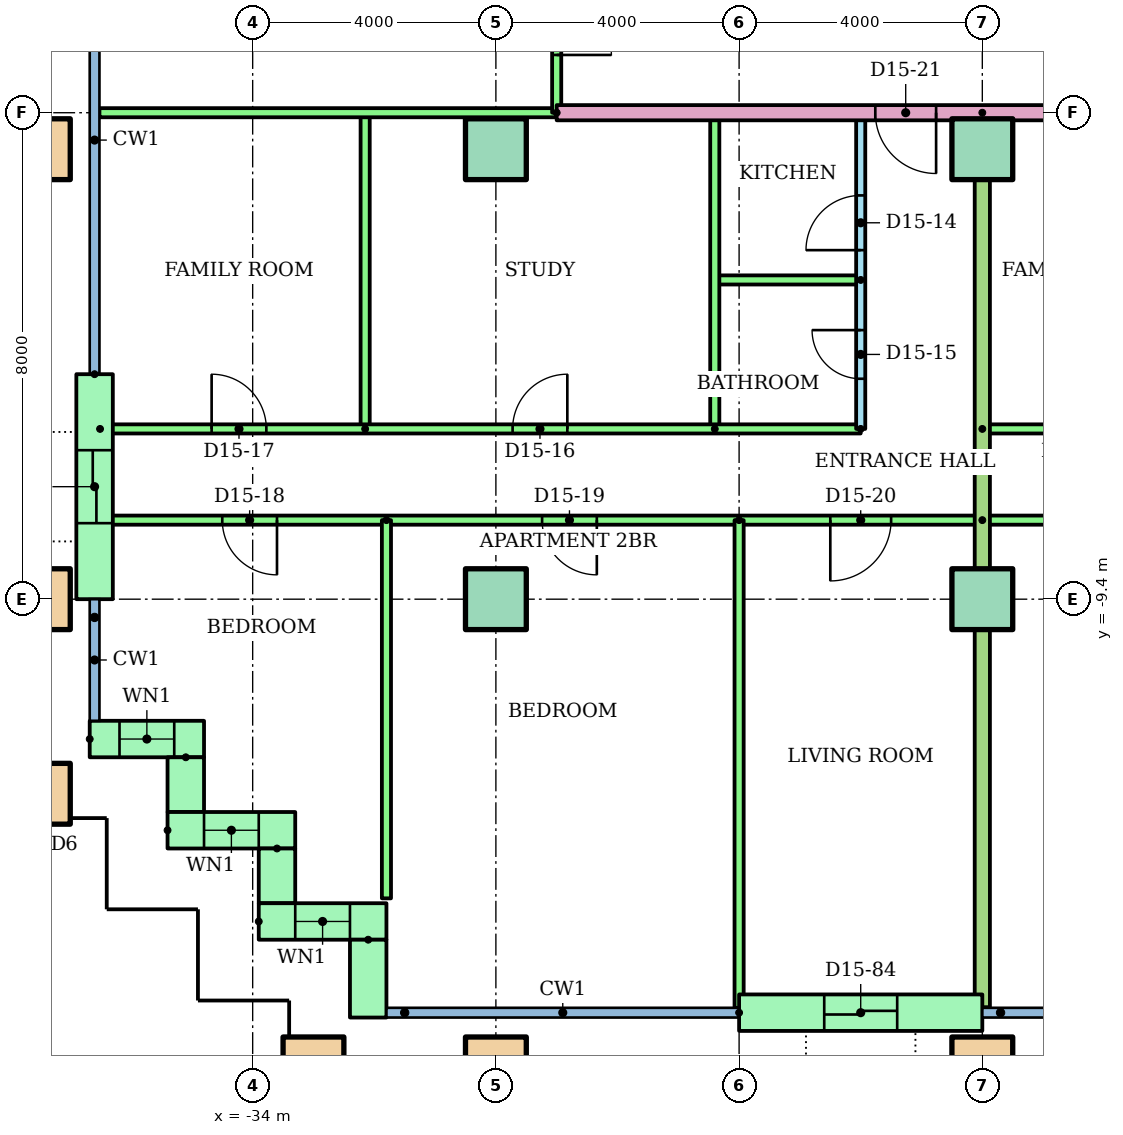
"""IFC4 building model, lengths in metres.
Left out: names, types, materials, properties, quantities, classifications, styles, units other than length and angle.
Written with IfcOpenShell. Run it as: python <this file> out.ifc"""

import sys

from ifc_helpers import new_model, si_unit, direction, frame, frame_2d, origin, origin_2d, place, context, subcontext, project, spatial, rectangle, hollow_rectangle, extrude, element, fill, save


model = new_model("IFC4")
c1 = context("Model", 3, precision=1e-05, world=origin(), true_north=direction((0.0, 1.0)))
c2 = subcontext(c1, "Body", "Model", "MODEL_VIEW")
j1 = project(units=[si_unit("LENGTHUNIT", "METRE"), si_unit("PLANEANGLEUNIT", "RADIAN")], contexts=[c1])
p1 = place(None, origin())
s1 = spatial("IfcSite", under=j1, at=p1, CompositionType="ELEMENT")
p2 = place(p1, origin())
s2 = spatial("IfcBuilding", under=s1, at=p2, CompositionType="ELEMENT")
p3 = place(p2, frame((0.0, 0.0, 57.6)))
s3 = spatial("IfcBuildingStorey", under=s2, at=p3, CompositionType="ELEMENT", Elevation=57.6)
for number, where in (
    (1, (-33.0, -17.1, 0.0)),
    (2, (-30.0, -17.1, 0.0)),
    (3, (-22.0, -17.1, 0.0)),
    (4, (-37.5, -12.6, 0.0)),
    (5, (-37.5, -9.4, 0.0)),
):
    element("IfcColumn", number, at=place(p3, frame(where)), inside=s3, PredefinedType="COLUMN", context=c2, shape_type="SweptSolid", body=[
        extrude(hollow_rectangle(XDim=1.0, YDim=1.0, WallThickness=0.05, at=origin_2d()), origin(), (0.0, 0.0, 1.0), 3.2),
    ])
for number, where in (
    (6, (-30.0, -9.4, 0.0)),
    (7, (-22.0, -9.4, 0.0)),
):
    element("IfcColumn", number, at=place(p3, frame(where)), inside=s3, PredefinedType="COLUMN", context=c2, shape_type="SweptSolid", body=[
        extrude(rectangle(XDim=1.0, YDim=1.0, at=origin_2d()), origin(), (0.0, 0.0, 1.0), 3.2),
    ])
p4 = place(p3, frame((-37.5, -2.0, 0.0)))
e8 = element("IfcColumn", 8, at=p4, inside=s3, PredefinedType="COLUMN", context=c2, shape_type="SweptSolid", body=[
    extrude(hollow_rectangle(XDim=1.0, YDim=1.0, WallThickness=0.05, at=origin_2d()), origin(), (0.0, 0.0, 1.0), 3.2),
])
for number, where in (
    (9, (-30.0, -2.0, 0.0)),
    (10, (-22.0, -2.0, 0.0)),
):
    element("IfcColumn", number, at=place(p3, frame(where)), inside=s3, PredefinedType="COLUMN", context=c2, shape_type="SweptSolid", body=[
        extrude(rectangle(XDim=1.0, YDim=1.0, at=origin_2d()), origin(), (0.0, 0.0, 1.0), 3.2),
    ])
p5 = place(p3, frame((-36.6, -5.7, 0.0), z_axis=(0.0, 0.0, 1.0), x_axis=(0.0, -1.0, 0.0)))
e11 = element("IfcWall", 11, at=p5, inside=s3, PredefinedType="STANDARD", context=c2, shape_type="SweptSolid", body=[
    extrude(rectangle(XDim=3.7, YDim=0.6, at=frame_2d((1.85, 0.0))), origin(), (0.0, 0.0, 1.0), 2.92),
])
p6 = place(p5, frame((1.25, 0.0, 0.0)))
e12 = element("IfcOpeningElement", 12, at=p6, cuts=e11, PredefinedType="OPENING", context=c2, shape_type="SweptSolid", body=[
    extrude(rectangle(XDim=1.2, YDim=2.1, at=frame_2d((0.6, 1.05))), frame((0.0, 0.31, 0.0), z_axis=(0.0, -1.0, 0.0), x_axis=(1.0, 0.0, 0.0)), (0.0, 0.0, 1.0), 0.62),
])
p7 = place(p3, frame((-36.68, -11.7, 0.0)))
e13 = element("IfcWall", 13, at=p7, inside=s3, PredefinedType="STANDARD", context=c2, shape_type="SweptSolid", body=[
    extrude(rectangle(XDim=1.88, YDim=0.6, at=frame_2d((0.94, 0.0))), origin(), (0.0, 0.0, 1.0), 2.92),
])
p8 = place(p7, frame((0.49, 0.0, 0.9)))
e14 = element("IfcOpeningElement", 14, at=p8, cuts=e13, PredefinedType="OPENING", context=c2, shape_type="SweptSolid", body=[
    extrude(rectangle(XDim=0.9, YDim=1.5, at=frame_2d((0.45, 0.75))), frame((0.0, 0.31, 0.0), z_axis=(0.0, -1.0, 0.0), x_axis=(1.0, 0.0, 0.0)), (0.0, 0.0, 1.0), 0.62),
])
p9 = place(p3, frame((-35.1, -12.0, 0.0), z_axis=(0.0, 0.0, 1.0), x_axis=(0.0, -1.0, 0.0)))
e15 = element("IfcWall", 15, at=p9, inside=s3, PredefinedType="STANDARD", context=c2, shape_type="SweptSolid", body=[
    extrude(rectangle(XDim=0.9, YDim=0.6, at=frame_2d((0.45, 0.0))), origin(), (0.0, 0.0, 1.0), 2.92),
])
p10 = place(p3, frame((-35.4, -13.2, 0.0)))
e16 = element("IfcWall", 16, at=p10, inside=s3, PredefinedType="STANDARD", context=c2, shape_type="SweptSolid", body=[
    extrude(rectangle(XDim=2.1, YDim=0.6, at=frame_2d((1.05, 0.0))), origin(), (0.0, 0.0, 1.0), 2.92),
])
p11 = place(p10, frame((0.6, 0.0, 0.9)))
e17 = element("IfcOpeningElement", 17, at=p11, cuts=e16, PredefinedType="OPENING", context=c2, shape_type="SweptSolid", body=[
    extrude(rectangle(XDim=0.9, YDim=1.5, at=frame_2d((0.45, 0.75))), frame((0.0, 0.31, 0.0), z_axis=(0.0, -1.0, 0.0), x_axis=(1.0, 0.0, 0.0)), (0.0, 0.0, 1.0), 0.62),
])
p12 = place(p3, frame((-33.6, -13.5, 0.0), z_axis=(0.0, 0.0, 1.0), x_axis=(0.0, -1.0, 0.0)))
e18 = element("IfcWall", 18, at=p12, inside=s3, PredefinedType="STANDARD", context=c2, shape_type="SweptSolid", body=[
    extrude(rectangle(XDim=0.9, YDim=0.6, at=frame_2d((0.45, 0.0))), origin(), (0.0, 0.0, 1.0), 2.92),
])
p13 = place(p3, frame((-33.9, -14.7, 0.0)))
e19 = element("IfcWall", 19, at=p13, inside=s3, PredefinedType="STANDARD", context=c2, shape_type="SweptSolid", body=[
    extrude(rectangle(XDim=2.1, YDim=0.6, at=frame_2d((1.05, 0.0))), origin(), (0.0, 0.0, 1.0), 2.92),
])
p14 = place(p13, frame((0.6, 0.0, 0.9)))
e20 = element("IfcOpeningElement", 20, at=p14, cuts=e19, PredefinedType="OPENING", context=c2, shape_type="SweptSolid", body=[
    extrude(rectangle(XDim=0.9, YDim=1.5, at=frame_2d((0.45, 0.75))), frame((0.0, 0.31, 0.0), z_axis=(0.0, -1.0, 0.0), x_axis=(1.0, 0.0, 0.0)), (0.0, 0.0, 1.0), 0.62),
])
p15 = place(p3, frame((-32.1, -15.0, 0.0), z_axis=(0.0, 0.0, 1.0), x_axis=(0.0, -1.0, 0.0)))
e21 = element("IfcWall", 21, at=p15, inside=s3, PredefinedType="STANDARD", context=c2, shape_type="SweptSolid", body=[
    extrude(rectangle(XDim=1.28, YDim=0.6, at=frame_2d((0.64, 0.0))), origin(), (0.0, 0.0, 1.0), 2.92),
])
p16 = place(p3, frame((-26.0, -16.2, 0.0)))
e22 = element("IfcWall", 22, at=p16, inside=s3, PredefinedType="STANDARD", context=c2, shape_type="SweptSolid", body=[
    extrude(rectangle(XDim=4.0, YDim=0.6, at=frame_2d((2.0, 0.0))), origin(), (0.0, 0.0, 1.0), 2.92),
])
p17 = place(p16, frame((1.4, 0.0, 0.0)))
e23 = element("IfcOpeningElement", 23, at=p17, cuts=e22, PredefinedType="OPENING", context=c2, shape_type="SweptSolid", body=[
    extrude(rectangle(XDim=1.2, YDim=2.1, at=frame_2d((0.6, 1.05))), frame((0.0, 0.31, 0.0), z_axis=(0.0, -1.0, 0.0), x_axis=(1.0, 0.0, 0.0)), (0.0, 0.0, 1.0), 0.62),
])
p18 = place(p3, frame((-24.0, -6.6, 0.0), z_axis=(0.0, 0.0, 1.0), x_axis=(0.0, 1.0, 0.0)))
e24 = element("IfcWall", 24, at=p18, inside=s3, PredefinedType="PARTITIONING", context=c2, shape_type="SweptSolid", body=[
    extrude(rectangle(XDim=5.2, YDim=0.15, at=frame_2d((2.6, 0.0))), origin(), (0.0, 0.0, 1.0), 2.4),
])
p19 = place(p18, frame((2.94, 0.0, 0.0)))
e25 = element("IfcOpeningElement", 25, at=p19, cuts=e24, PredefinedType="OPENING", context=c2, shape_type="SweptSolid", body=[
    extrude(rectangle(XDim=0.9, YDim=2.1, at=frame_2d((0.45, 1.05))), frame((0.0, 0.085, 0.0), z_axis=(0.0, -1.0, 0.0), x_axis=(1.0, 0.0, 0.0)), (0.0, 0.0, 1.0), 0.17),
])
p20 = place(p18, frame((0.825, 0.0, 0.0)))
e26 = element("IfcOpeningElement", 26, at=p20, cuts=e24, PredefinedType="OPENING", context=c2, shape_type="SweptSolid", body=[
    extrude(rectangle(XDim=0.8, YDim=2.1, at=frame_2d((0.4, 1.05))), frame((0.0, 0.085, 0.0), z_axis=(0.0, -1.0, 0.0), x_axis=(1.0, 0.0, 0.0)), (0.0, 0.0, 1.0), 0.17),
])
p21 = place(p3, frame((-24.0, -4.15, 0.0), z_axis=(0.0, 0.0, 1.0), x_axis=(-1.0, 0.0, 0.0)))
e27 = element("IfcWall", 27, at=p21, inside=s3, PredefinedType="PARTITIONING", context=c2, shape_type="SweptSolid", body=[
    extrude(rectangle(XDim=2.4, YDim=0.15, at=frame_2d((1.2, 0.0))), origin(), (0.0, 0.0, 1.0), 2.4),
])
for number, where, z_axis, x_axis in (
    (28, (-26.4, -6.6, 0.0), (0.0, 0.0, 1.0), (0.0, 1.0, 0.0)),
    (29, (-32.15, -6.6, 0.0), (0.0, 0.0, 1.0), (0.0, 1.0, 0.0)),
):
    element("IfcWall", number, at=place(p3, frame(where, z_axis=z_axis, x_axis=x_axis)), inside=s3, PredefinedType="PARTITIONING", context=c2, shape_type="SweptSolid", body=[
        extrude(rectangle(XDim=5.2, YDim=0.15, at=frame_2d((2.6, 0.0))), origin(), (0.0, 0.0, 1.0), 2.4),
    ])
p22 = place(p3, frame((-36.51, -6.6, 0.0)))
e30 = element("IfcWall", 30, at=p22, inside=s3, PredefinedType="PARTITIONING", context=c2, shape_type="SweptSolid", body=[
    extrude(rectangle(XDim=12.51, YDim=0.15, at=frame_2d((6.255, 0.0))), origin(), (0.0, 0.0, 1.0), 2.4),
])
p23 = place(p22, frame((6.785, 0.0, 0.0)))
e31 = element("IfcOpeningElement", 31, at=p23, cuts=e30, PredefinedType="OPENING", context=c2, shape_type="SweptSolid", body=[
    extrude(rectangle(XDim=0.9, YDim=2.1, at=frame_2d((0.45, 1.05))), frame((0.0, 0.085, 0.0), z_axis=(0.0, -1.0, 0.0), x_axis=(1.0, 0.0, 0.0)), (0.0, 0.0, 1.0), 0.17),
])
p24 = place(p22, frame((1.835, 0.0, 0.0)))
e32 = element("IfcOpeningElement", 32, at=p24, cuts=e30, PredefinedType="OPENING", context=c2, shape_type="SweptSolid", body=[
    extrude(rectangle(XDim=0.9, YDim=2.1, at=frame_2d((0.45, 1.05))), frame((0.0, 0.085, 0.0), z_axis=(0.0, -1.0, 0.0), x_axis=(1.0, 0.0, 0.0)), (0.0, 0.0, 1.0), 0.17),
])
p25 = place(p3, frame((-22.0, -8.1, 0.0), z_axis=(0.0, 0.0, 1.0), x_axis=(-1.0, 0.0, 0.0)))
e33 = element("IfcWall", 33, at=p25, inside=s3, PredefinedType="PARTITIONING", context=c2, shape_type="SweptSolid", body=[
    extrude(rectangle(XDim=14.51, YDim=0.15, at=frame_2d((7.255, 0.0))), origin(), (0.0, 0.0, 1.0), 2.4),
])
p26 = place(p25, frame((11.6, 0.0, 0.0)))
e34 = element("IfcOpeningElement", 34, at=p26, cuts=e33, PredefinedType="OPENING", context=c2, shape_type="SweptSolid", body=[
    extrude(rectangle(XDim=0.9, YDim=2.1, at=frame_2d((0.45, 1.05))), frame((0.0, 0.085, 0.0), z_axis=(0.0, -1.0, 0.0), x_axis=(1.0, 0.0, 0.0)), (0.0, 0.0, 1.0), 0.17),
])
p27 = place(p25, frame((6.34, 0.0, 0.0)))
e35 = element("IfcOpeningElement", 35, at=p27, cuts=e33, PredefinedType="OPENING", context=c2, shape_type="SweptSolid", body=[
    extrude(rectangle(XDim=0.9, YDim=2.1, at=frame_2d((0.45, 1.05))), frame((0.0, 0.085, 0.0), z_axis=(0.0, -1.0, 0.0), x_axis=(1.0, 0.0, 0.0)), (0.0, 0.0, 1.0), 0.17),
])
p28 = place(p25, frame((1.5, 0.0, 0.0)))
e36 = element("IfcOpeningElement", 36, at=p28, cuts=e33, PredefinedType="OPENING", context=c2, shape_type="SweptSolid", body=[
    extrude(rectangle(XDim=1.0, YDim=2.1, at=frame_2d((0.5, 1.05))), frame((0.0, 0.085, 0.0), z_axis=(0.0, -1.0, 0.0), x_axis=(1.0, 0.0, 0.0)), (0.0, 0.0, 1.0), 0.17),
])
p29 = place(p3, frame((-31.8, -8.1, 0.0), z_axis=(0.0, 0.0, 1.0), x_axis=(0.0, -1.0, 0.0)))
e37 = element("IfcWall", 37, at=p29, inside=s3, PredefinedType="PARTITIONING", context=c2, shape_type="SweptSolid", body=[
    extrude(rectangle(XDim=6.22, YDim=0.15, at=frame_2d((3.11, 0.0))), origin(), (0.0, 0.0, 1.0), 2.4),
])
p30 = place(p3, frame((-26.0, -8.1, 0.0), z_axis=(0.0, 0.0, 1.0), x_axis=(0.0, -1.0, 0.0)))
e38 = element("IfcWall", 38, at=p30, inside=s3, PredefinedType="PARTITIONING", context=c2, shape_type="SweptSolid", body=[
    extrude(rectangle(XDim=8.021, YDim=0.15, at=frame_2d((4.01, 0.0))), origin(), (0.0, 0.0, 1.0), 2.4),
])
p31 = place(p3, frame((-22.0, -6.6, 0.0)))
e39 = element("IfcWall", 39, at=p31, inside=s3, PredefinedType="PARTITIONING", context=c2, shape_type="SweptSolid", body=[
    extrude(rectangle(XDim=14.0, YDim=0.15, at=frame_2d((7.0, 0.0))), origin(), (0.0, 0.0, 1.0), 2.4),
])
p32 = place(p31, frame((8.775, 0.0, 0.0)))
e40 = element("IfcOpeningElement", 40, at=p32, cuts=e39, PredefinedType="OPENING", context=c2, shape_type="SweptSolid", body=[
    extrude(rectangle(XDim=0.9, YDim=2.1, at=frame_2d((0.45, 1.05))), frame((0.0, 0.085, 0.0), z_axis=(0.0, -1.0, 0.0), x_axis=(1.0, 0.0, 0.0)), (0.0, 0.0, 1.0), 0.17),
])
p33 = place(p31, frame((4.525, 0.0, 0.0)))
e41 = element("IfcOpeningElement", 41, at=p33, cuts=e39, PredefinedType="OPENING", context=c2, shape_type="SweptSolid", body=[
    extrude(rectangle(XDim=0.9, YDim=2.1, at=frame_2d((0.45, 1.05))), frame((0.0, 0.085, 0.0), z_axis=(0.0, -1.0, 0.0), x_axis=(1.0, 0.0, 0.0)), (0.0, 0.0, 1.0), 0.17),
])
p34 = place(p31, frame((1.1, 0.0, 0.0)))
e42 = element("IfcOpeningElement", 42, at=p34, cuts=e39, PredefinedType="OPENING", context=c2, shape_type="SweptSolid", body=[
    extrude(rectangle(XDim=0.9, YDim=2.1, at=frame_2d((0.45, 1.05))), frame((0.0, 0.085, 0.0), z_axis=(0.0, -1.0, 0.0), x_axis=(1.0, 0.0, 0.0)), (0.0, 0.0, 1.0), 0.17),
])
p35 = place(p3, frame((-6.0, -8.1, 0.0), z_axis=(0.0, 0.0, 1.0), x_axis=(-1.0, 0.0, 0.0)))
e43 = element("IfcWall", 43, at=p35, inside=s3, PredefinedType="PARTITIONING", context=c2, shape_type="SweptSolid", body=[
    extrude(rectangle(XDim=16.0, YDim=0.15, at=frame_2d((8.0, 0.0))), origin(), (0.0, 0.0, 1.0), 2.4),
])
p36 = place(p35, frame((13.55, 0.0, 0.0)))
e44 = element("IfcOpeningElement", 44, at=p36, cuts=e43, PredefinedType="OPENING", context=c2, shape_type="SweptSolid", body=[
    extrude(rectangle(XDim=0.9, YDim=2.1, at=frame_2d((0.45, 1.05))), frame((0.0, 0.085, 0.0), z_axis=(0.0, -1.0, 0.0), x_axis=(1.0, 0.0, 0.0)), (0.0, 0.0, 1.0), 0.17),
])
p37 = place(p35, frame((9.5, 0.0, 0.0)))
e45 = element("IfcOpeningElement", 45, at=p37, cuts=e43, PredefinedType="OPENING", context=c2, shape_type="SweptSolid", body=[
    extrude(rectangle(XDim=1.0, YDim=2.1, at=frame_2d((0.5, 1.05))), frame((0.0, 0.085, 0.0), z_axis=(0.0, -1.0, 0.0), x_axis=(1.0, 0.0, 0.0)), (0.0, 0.0, 1.0), 0.17),
])
p38 = place(p35, frame((5.55, 0.0, 0.0)))
e46 = element("IfcOpeningElement", 46, at=p38, cuts=e43, PredefinedType="OPENING", context=c2, shape_type="SweptSolid", body=[
    extrude(rectangle(XDim=0.9, YDim=2.1, at=frame_2d((0.45, 1.05))), frame((0.0, 0.085, 0.0), z_axis=(0.0, -1.0, 0.0), x_axis=(1.0, 0.0, 0.0)), (0.0, 0.0, 1.0), 0.17),
])
p39 = place(p35, frame((1.55, 0.0, 0.0)))
e47 = element("IfcOpeningElement", 47, at=p39, cuts=e43, PredefinedType="OPENING", context=c2, shape_type="SweptSolid", body=[
    extrude(rectangle(XDim=0.9, YDim=2.1, at=frame_2d((0.45, 1.05))), frame((0.0, 0.085, 0.0), z_axis=(0.0, -1.0, 0.0), x_axis=(1.0, 0.0, 0.0)), (0.0, 0.0, 1.0), 0.17),
])
p40 = place(p3, frame((-22.0, -1.4, 0.0), z_axis=(0.0, 0.0, 1.0), x_axis=(0.0, -1.0, 0.0)))
e48 = element("IfcWall", 48, at=p40, inside=s3, PredefinedType="PARTITIONING", context=c2, shape_type="SweptSolid", body=[
    extrude(rectangle(XDim=14.71, YDim=0.25, at=frame_2d((7.355, 0.0))), origin(), (0.0, 0.0, 1.0), 2.4),
])
p41 = place(p3, frame((-14.0, -1.4, 0.0), z_axis=(0.0, 0.0, 1.0), x_axis=(-1.0, 0.0, 0.0)))
e49 = element("IfcWall", 49, at=p41, inside=s3, PredefinedType="PARTITIONING", context=c2, shape_type="SweptSolid", body=[
    extrude(rectangle(XDim=15.0, YDim=0.25, at=frame_2d((7.5, 0.0))), origin(), (0.0, 0.0, 1.0), 2.4),
])
p42 = place(p41, frame((8.76, 0.0, 0.0)))
e50 = element("IfcOpeningElement", 50, at=p42, cuts=e49, PredefinedType="OPENING", context=c2, shape_type="SweptSolid", body=[
    extrude(rectangle(XDim=1.0, YDim=2.1, at=frame_2d((0.5, 1.05))), frame((0.0, 0.135, 0.0), z_axis=(0.0, -1.0, 0.0), x_axis=(1.0, 0.0, 0.0)), (0.0, 0.0, 1.0), 0.27),
])
p43 = place(p3, frame((-29.0, -1.4, 0.0), z_axis=(0.0, 0.0, 1.0), x_axis=(-1.0, 0.0, 0.0)))
e51 = element("IfcWall", 51, at=p43, inside=s3, PredefinedType="PARTITIONING", context=c2, shape_type="SweptSolid", body=[
    extrude(rectangle(XDim=7.52, YDim=0.15, at=frame_2d((3.76, 0.0))), origin(), (0.0, 0.0, 1.0), 2.4),
])
p44 = place(p3, frame((-29.0, 1.4, 0.0), z_axis=(0.0, 0.0, 1.0), x_axis=(0.0, -1.0, 0.0)))
e52 = element("IfcWall", 52, at=p44, inside=s3, PredefinedType="PARTITIONING", context=c2, shape_type="SweptSolid", body=[
    extrude(rectangle(XDim=2.8, YDim=0.15, at=frame_2d((1.4, 0.0))), origin(), (0.0, 0.0, 1.0), 2.4),
])
p45 = place(p44, frame((0.95, 0.0, 0.0)))
e53 = element("IfcOpeningElement", 53, at=p45, cuts=e52, PredefinedType="OPENING", context=c2, shape_type="SweptSolid", body=[
    extrude(rectangle(XDim=0.9, YDim=2.1, at=frame_2d((0.45, 1.05))), frame((0.0, 0.085, 0.0), z_axis=(0.0, -1.0, 0.0), x_axis=(1.0, 0.0, 0.0)), (0.0, 0.0, 1.0), 0.17),
])
p46 = place(p8, origin())
e54 = element("IfcWindow", 54, at=p46, inside=s3, PartitioningType="SINGLE_PANEL", PredefinedType="WINDOW", context=c2, shape_type="SweptSolid", body=[
    extrude(rectangle(XDim=0.9, YDim=1.5, at=frame_2d((0.45, 0.75))), frame((0.0, 0.03, 0.0), z_axis=(0.0, -1.0, 0.0), x_axis=(1.0, 0.0, 0.0)), (0.0, 0.0, 1.0), 0.06),
])
fill(e14, e54)
p47 = place(p11, origin())
e55 = element("IfcWindow", 55, at=p47, inside=s3, PartitioningType="SINGLE_PANEL", PredefinedType="WINDOW", context=c2, shape_type="SweptSolid", body=[
    extrude(rectangle(XDim=0.9, YDim=1.5, at=frame_2d((0.45, 0.75))), frame((0.0, 0.03, 0.0), z_axis=(0.0, -1.0, 0.0), x_axis=(1.0, 0.0, 0.0)), (0.0, 0.0, 1.0), 0.06),
])
fill(e17, e55)
p48 = place(p14, origin())
e56 = element("IfcWindow", 56, at=p48, inside=s3, PartitioningType="SINGLE_PANEL", PredefinedType="WINDOW", context=c2, shape_type="SweptSolid", body=[
    extrude(rectangle(XDim=0.9, YDim=1.5, at=frame_2d((0.45, 0.75))), frame((0.0, 0.03, 0.0), z_axis=(0.0, -1.0, 0.0), x_axis=(1.0, 0.0, 0.0)), (0.0, 0.0, 1.0), 0.06),
])
fill(e20, e56)
p49 = place(p19, origin())
e57 = element("IfcDoor", 57, at=p49, inside=s3, OperationType="SINGLE_SWING_LEFT", PredefinedType="DOOR", context=c2, shape_type="SweptSolid", body=[
    extrude(rectangle(XDim=0.9, YDim=2.1, at=frame_2d((0.45, 1.05))), frame((0.0, 0.025, 0.0), z_axis=(0.0, -1.0, 0.0), x_axis=(1.0, 0.0, 0.0)), (0.0, 0.0, 1.0), 0.05),
])
fill(e25, e57)
p50 = place(p20, origin())
e58 = element("IfcDoor", 58, at=p50, inside=s3, OperationType="SINGLE_SWING_RIGHT", PredefinedType="DOOR", context=c2, shape_type="SweptSolid", body=[
    extrude(rectangle(XDim=0.8, YDim=2.1, at=frame_2d((0.4, 1.05))), frame((0.0, 0.025, 0.0), z_axis=(0.0, -1.0, 0.0), x_axis=(1.0, 0.0, 0.0)), (0.0, 0.0, 1.0), 0.05),
])
fill(e26, e58)
p51 = place(p23, origin())
e59 = element("IfcDoor", 59, at=p51, inside=s3, OperationType="SINGLE_SWING_RIGHT", PredefinedType="DOOR", context=c2, shape_type="SweptSolid", body=[
    extrude(rectangle(XDim=0.9, YDim=2.1, at=frame_2d((0.45, 1.05))), frame((0.0, 0.025, 0.0), z_axis=(0.0, -1.0, 0.0), x_axis=(1.0, 0.0, 0.0)), (0.0, 0.0, 1.0), 0.05),
])
fill(e31, e59)
p52 = place(p24, origin())
e60 = element("IfcDoor", 60, at=p52, inside=s3, OperationType="SINGLE_SWING_LEFT", PredefinedType="DOOR", context=c2, shape_type="SweptSolid", body=[
    extrude(rectangle(XDim=0.9, YDim=2.1, at=frame_2d((0.45, 1.05))), frame((0.0, 0.025, 0.0), z_axis=(0.0, -1.0, 0.0), x_axis=(1.0, 0.0, 0.0)), (0.0, 0.0, 1.0), 0.05),
])
fill(e32, e60)
p53 = place(p26, origin())
e61 = element("IfcDoor", 61, at=p53, inside=s3, OperationType="SINGLE_SWING_LEFT", PredefinedType="DOOR", context=c2, shape_type="SweptSolid", body=[
    extrude(rectangle(XDim=0.9, YDim=2.1, at=frame_2d((0.45, 1.05))), frame((0.0, 0.025, 0.0), z_axis=(0.0, -1.0, 0.0), x_axis=(1.0, 0.0, 0.0)), (0.0, 0.0, 1.0), 0.05),
])
fill(e34, e61)
p54 = place(p27, origin())
e62 = element("IfcDoor", 62, at=p54, inside=s3, OperationType="SINGLE_SWING_LEFT", PredefinedType="DOOR", context=c2, shape_type="SweptSolid", body=[
    extrude(rectangle(XDim=0.9, YDim=2.1, at=frame_2d((0.45, 1.05))), frame((0.0, 0.025, 0.0), z_axis=(0.0, -1.0, 0.0), x_axis=(1.0, 0.0, 0.0)), (0.0, 0.0, 1.0), 0.05),
])
fill(e35, e62)
p55 = place(p28, origin())
e63 = element("IfcDoor", 63, at=p55, inside=s3, OperationType="SINGLE_SWING_RIGHT", PredefinedType="DOOR", context=c2, shape_type="SweptSolid", body=[
    extrude(rectangle(XDim=1.0, YDim=2.1, at=frame_2d((0.5, 1.05))), frame((0.0, 0.025, 0.0), z_axis=(0.0, -1.0, 0.0), x_axis=(1.0, 0.0, 0.0)), (0.0, 0.0, 1.0), 0.05),
])
fill(e36, e63)
p56 = place(p42, origin())
e64 = element("IfcDoor", 64, at=p56, inside=s3, OperationType="SINGLE_SWING_LEFT", PredefinedType="DOOR", context=c2, shape_type="SweptSolid", body=[
    extrude(rectangle(XDim=1.0, YDim=2.1, at=frame_2d((0.5, 1.05))), frame((0.0, 0.025, 0.0), z_axis=(0.0, -1.0, 0.0), x_axis=(1.0, 0.0, 0.0)), (0.0, 0.0, 1.0), 0.05),
])
fill(e50, e64)
p57 = place(p45, origin())
e65 = element("IfcDoor", 65, at=p57, inside=s3, OperationType="SINGLE_SWING_RIGHT", PredefinedType="DOOR", context=c2, shape_type="SweptSolid", body=[
    extrude(rectangle(XDim=0.9, YDim=2.1, at=frame_2d((0.45, 1.05))), frame((0.0, 0.025, 0.0), z_axis=(0.0, -1.0, 0.0), x_axis=(1.0, 0.0, 0.0)), (0.0, 0.0, 1.0), 0.05),
])
fill(e53, e65)
p58 = place(p6, origin())
e66 = element("IfcDoor", 66, at=p58, inside=s3, OperationType="SLIDING_TO_LEFT", PredefinedType="DOOR", context=c2, shape_type="SweptSolid", body=[
    extrude(rectangle(XDim=1.2, YDim=2.1, at=frame_2d((0.6, 1.05))), frame((0.0, 0.025, 0.0), z_axis=(0.0, -1.0, 0.0), x_axis=(1.0, 0.0, 0.0)), (0.0, 0.0, 1.0), 0.05),
])
fill(e12, e66)
p59 = place(p17, origin())
e67 = element("IfcDoor", 67, at=p59, inside=s3, OperationType="SLIDING_TO_LEFT", PredefinedType="DOOR", context=c2, shape_type="SweptSolid", body=[
    extrude(rectangle(XDim=1.2, YDim=2.1, at=frame_2d((0.6, 1.05))), frame((0.0, 0.025, 0.0), z_axis=(0.0, -1.0, 0.0), x_axis=(1.0, 0.0, 0.0)), (0.0, 0.0, 1.0), 0.05),
])
fill(e23, e67)
save(model, sys.argv[1])
